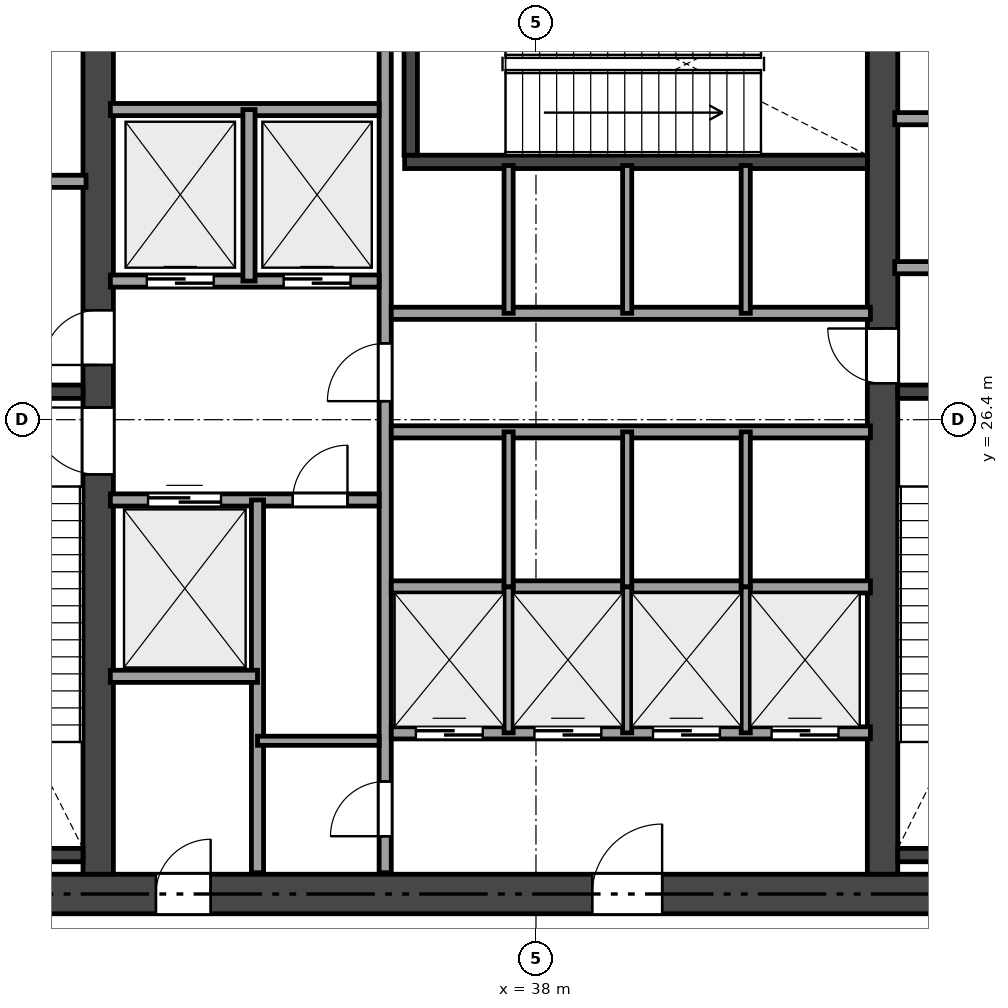
"""IFC4 building model, lengths in metres.
Left out: names, types, materials, properties, quantities, classifications, styles, units other than length and angle.
Written with IfcOpenShell. Run it as: python <this file> out.ifc"""

import sys

from ifc_helpers import new_model, si_unit, direction, frame, frame_2d, origin, place, context, subcontext, project, spatial, rectangle, extrude, element, fill, save


model = new_model("IFC4")
c1 = context("Model", 3, precision=1e-05, world=origin(), true_north=direction((0.0, 1.0)))
c2 = subcontext(c1, "Body", "Model", "MODEL_VIEW")
j1 = project(units=[si_unit("LENGTHUNIT", "METRE"), si_unit("PLANEANGLEUNIT", "RADIAN")], contexts=[c1])
p1 = place(None, origin())
s1 = spatial("IfcSite", under=j1, at=p1, CompositionType="ELEMENT")
p2 = place(p1, origin())
s2 = spatial("IfcBuilding", under=s1, at=p2, CompositionType="ELEMENT")
p3 = place(p2, frame((0.0, 0.0, 10.8)))
s3 = spatial("IfcBuildingStorey", under=s2, at=p3, CompositionType="ELEMENT", Elevation=10.8)
p4 = place(p3, frame((26.475, 18.6, 0.0), z_axis=(0.0, 0.0, 1.0), x_axis=(1.0, 0.0, 0.0)))
e1 = element("IfcWall", 1, at=p4, inside=s3, PredefinedType="SHEAR", context=c2, shape_type="SweptSolid", body=[
    extrude(rectangle(XDim=21.45, YDim=0.65, at=frame_2d((10.725, 0.0))), origin(), (0.0, 0.0, 1.0), 5.05),
])
p5 = place(p4, frame((12.45, 0.0, 0.0)))
e2 = element("IfcOpeningElement", 2, at=p5, cuts=e1, PredefinedType="OPENING", context=c2, shape_type="SweptSolid", body=[
    extrude(rectangle(XDim=1.15, YDim=2.15, at=frame_2d((0.575, 1.075))), frame((0.0, 0.335, 0.0), z_axis=(0.0, -1.0, 0.0), x_axis=(1.0, 0.0, 0.0)), (0.0, 0.0, 1.0), 0.67),
])
p6 = place(p4, frame((5.275, 0.0, 0.0)))
e3 = element("IfcOpeningElement", 3, at=p6, cuts=e1, PredefinedType="OPENING", context=c2, shape_type="SweptSolid", body=[
    extrude(rectangle(XDim=0.9, YDim=2.1, at=frame_2d((0.45, 1.05))), frame((0.0, 0.335, 0.0), z_axis=(0.0, -1.0, 0.0), x_axis=(1.0, 0.0, 0.0)), (0.0, 0.0, 1.0), 0.67),
])
p7 = place(p3, frame((30.8, 18.925, 0.0), z_axis=(0.0, 0.0, 1.0), x_axis=(0.0, 1.0, 0.0)))
e4 = element("IfcWall", 4, at=p7, inside=s3, PredefinedType="SHEAR", context=c2, shape_type="SweptSolid", body=[
    extrude(rectangle(XDim=14.95, YDim=0.5, at=frame_2d((7.475, 0.0))), origin(), (0.0, 0.0, 1.0), 5.05),
])
p8 = place(p7, frame((6.575, 0.0, 0.0)))
e5 = element("IfcOpeningElement", 5, at=p8, cuts=e4, PredefinedType="OPENING", context=c2, shape_type="SweptSolid", body=[
    extrude(rectangle(XDim=1.1, YDim=2.15, at=frame_2d((0.55, 1.075))), frame((0.0, 0.26, 0.0), z_axis=(0.0, -1.0, 0.0), x_axis=(1.0, 0.0, 0.0)), (0.0, 0.0, 1.0), 0.52),
])
p9 = place(p7, frame((8.375, 0.0, 0.0)))
e6 = element("IfcOpeningElement", 6, at=p9, cuts=e4, PredefinedType="OPENING", context=c2, shape_type="SweptSolid", body=[
    extrude(rectangle(XDim=0.9, YDim=2.1, at=frame_2d((0.45, 1.05))), frame((0.0, 0.26, 0.0), z_axis=(0.0, -1.0, 0.0), x_axis=(1.0, 0.0, 0.0)), (0.0, 0.0, 1.0), 0.52),
])
p10 = place(p3, frame((43.7, 18.925, 0.0), z_axis=(0.0, 0.0, 1.0), x_axis=(0.0, 1.0, 0.0)))
e7 = element("IfcWall", 7, at=p10, inside=s3, PredefinedType="SHEAR", context=c2, shape_type="SweptSolid", body=[
    extrude(rectangle(XDim=14.95, YDim=0.5, at=frame_2d((7.475, 0.0))), origin(), (0.0, 0.0, 1.0), 5.05),
])
p11 = place(p10, frame((8.075, 0.0, 0.0)))
e8 = element("IfcOpeningElement", 8, at=p11, cuts=e7, PredefinedType="OPENING", context=c2, shape_type="SweptSolid", body=[
    extrude(rectangle(XDim=0.9, YDim=2.1, at=frame_2d((0.45, 1.05))), frame((0.0, 0.26, 0.0), z_axis=(0.0, -1.0, 0.0), x_axis=(1.0, 0.0, 0.0)), (0.0, 0.0, 1.0), 0.52),
])
for number, where, z_axis, x_axis in (
    (9, (27.125, 26.86, 0.0), (0.0, 0.0, 1.0), (1.0, 0.0, 0.0)),
    (10, (27.125, 19.24, 0.0), (0.0, 0.0, 1.0), (1.0, 0.0, 0.0)),
):
    element("IfcWall", number, at=place(p3, frame(where, z_axis=z_axis, x_axis=x_axis)), inside=s3, PredefinedType="SHEAR", context=c2, shape_type="SweptSolid", body=[
        extrude(rectangle(XDim=3.425, YDim=0.22, at=frame_2d((1.712, 0.0))), origin(), (0.0, 0.0, 1.0), 5.05),
    ])
for number, where, z_axis, x_axis in (
    (11, (43.95, 26.86, 0.0), (0.0, 0.0, 1.0), (1.0, 0.0, 0.0)),
    (12, (43.95, 19.24, 0.0), (0.0, 0.0, 1.0), (1.0, 0.0, 0.0)),
):
    element("IfcWall", number, at=place(p3, frame(where, z_axis=z_axis, x_axis=x_axis)), inside=s3, PredefinedType="SHEAR", context=c2, shape_type="SweptSolid", body=[
        extrude(rectangle(XDim=3.325, YDim=0.22, at=frame_2d((1.663, 0.0))), origin(), (0.0, 0.0, 1.0), 5.05),
    ])
p12 = place(p3, frame((35.84, 30.64, 0.0), z_axis=(0.0, 0.0, 1.0), x_axis=(1.0, 0.0, 0.0)))
e13 = element("IfcWall", 13, at=p12, inside=s3, PredefinedType="SHEAR", context=c2, shape_type="SweptSolid", body=[
    extrude(rectangle(XDim=7.61, YDim=0.22, at=frame_2d((3.805, 0.0))), origin(), (0.0, 0.0, 1.0), 5.05),
])
p13 = place(p3, frame((35.94, 30.75, 0.0), z_axis=(0.0, 0.0, 1.0), x_axis=(0.0, 1.0, 0.0)))
e14 = element("IfcWall", 14, at=p13, inside=s3, PredefinedType="SHEAR", context=c2, shape_type="SweptSolid", body=[
    extrude(rectangle(XDim=3.125, YDim=0.22, at=frame_2d((1.562, 0.0))), origin(), (0.0, 0.0, 1.0), 5.05),
])
p14 = place(p3, frame((27.15, 30.32, 0.0), z_axis=(0.0, 0.0, 1.0), x_axis=(1.0, 0.0, 0.0)))
e15 = element("IfcWall", 15, at=p14, inside=s3, PredefinedType="SOLIDWALL", context=c2, shape_type="SweptSolid", body=[
    extrude(rectangle(XDim=3.45, YDim=0.2, at=frame_2d((1.725, 0.0))), origin(), (0.0, 0.0, 1.0), 5.05),
])
p15 = place(p3, frame((43.9, 28.9, 0.0), z_axis=(0.0, 0.0, 1.0), x_axis=(1.0, 0.0, 0.0)))
e16 = element("IfcWall", 16, at=p15, inside=s3, PredefinedType="SOLIDWALL", context=c2, shape_type="SweptSolid", body=[
    extrude(rectangle(XDim=3.35, YDim=0.2, at=frame_2d((1.675, 0.0))), origin(), (0.0, 0.0, 1.0), 5.05),
])
p16 = place(p15, frame((1.15, 0.0, 0.0)))
e17 = element("IfcOpeningElement", 17, at=p16, cuts=e16, PredefinedType="OPENING", context=c2, shape_type="SweptSolid", body=[
    extrude(rectangle(XDim=0.9, YDim=2.1, at=frame_2d((0.45, 1.05))), frame((0.0, 0.11, 0.0), z_axis=(0.0, -1.0, 0.0), x_axis=(1.0, 0.0, 0.0)), (0.0, 0.0, 1.0), 0.22),
])
p17 = place(p3, frame((43.9, 31.35, 0.0), z_axis=(0.0, 0.0, 1.0), x_axis=(1.0, 0.0, 0.0)))
e18 = element("IfcWall", 18, at=p17, inside=s3, PredefinedType="SOLIDWALL", context=c2, shape_type="SweptSolid", body=[
    extrude(rectangle(XDim=3.35, YDim=0.2, at=frame_2d((1.675, 0.0))), origin(), (0.0, 0.0, 1.0), 5.05),
])
p18 = place(p3, frame((35.52, 18.95, 0.0), z_axis=(0.0, 0.0, 1.0), x_axis=(0.0, 1.0, 0.0)))
e19 = element("IfcWall", 19, at=p18, inside=s3, PredefinedType="SOLIDWALL", context=c2, shape_type="SweptSolid", body=[
    extrude(rectangle(XDim=14.9, YDim=0.2, at=frame_2d((7.45, 0.0))), origin(), (0.0, 0.0, 1.0), 4.571),
])
p19 = place(p18, frame((7.755, 0.0, 0.0)))
e20 = element("IfcOpeningElement", 20, at=p19, cuts=e19, PredefinedType="OPENING", context=c2, shape_type="SweptSolid", body=[
    extrude(rectangle(XDim=0.95, YDim=2.15, at=frame_2d((0.475, 1.075))), frame((0.0, 0.11, 0.0), z_axis=(0.0, -1.0, 0.0), x_axis=(1.0, 0.0, 0.0)), (0.0, 0.0, 1.0), 0.22),
])
p20 = place(p18, frame((0.6, 0.0, 0.0)))
e21 = element("IfcOpeningElement", 21, at=p20, cuts=e19, PredefinedType="OPENING", context=c2, shape_type="SweptSolid", body=[
    extrude(rectangle(XDim=0.9, YDim=2.1, at=frame_2d((0.45, 1.05))), frame((0.0, 0.11, 0.0), z_axis=(0.0, -1.0, 0.0), x_axis=(1.0, 0.0, 0.0)), (0.0, 0.0, 1.0), 0.22),
])
p21 = place(p3, frame((31.0, 28.68, 0.0), z_axis=(0.0, 0.0, 1.0), x_axis=(1.0, 0.0, 0.0)))
e22 = element("IfcWall", 22, at=p21, inside=s3, PredefinedType="SOLIDWALL", context=c2, shape_type="SweptSolid", body=[
    extrude(rectangle(XDim=4.42, YDim=0.2, at=frame_2d((2.21, 0.0))), origin(), (0.0, 0.0, 1.0), 5.05),
])
p22 = place(p21, frame((0.6, 0.0, 0.0)))
e23 = element("IfcOpeningElement", 23, at=p22, cuts=e22, PredefinedType="OPENING", context=c2, shape_type="SweptSolid", body=[
    extrude(rectangle(XDim=1.1, YDim=2.15, at=frame_2d((0.55, 1.075))), frame((0.0, 0.11, 0.0), z_axis=(0.0, -1.0, 0.0), x_axis=(1.0, 0.0, 0.0)), (0.0, 0.0, 1.0), 0.22),
])
p23 = place(p21, frame((2.85, 0.0, 0.0)))
e24 = element("IfcOpeningElement", 24, at=p23, cuts=e22, PredefinedType="OPENING", context=c2, shape_type="SweptSolid", body=[
    extrude(rectangle(XDim=1.1, YDim=2.15, at=frame_2d((0.55, 1.075))), frame((0.0, 0.11, 0.0), z_axis=(0.0, -1.0, 0.0), x_axis=(1.0, 0.0, 0.0)), (0.0, 0.0, 1.0), 0.22),
])
p24 = place(p3, frame((31.0, 31.5, 0.0), z_axis=(0.0, 0.0, 1.0), x_axis=(1.0, 0.0, 0.0)))
e25 = element("IfcWall", 25, at=p24, inside=s3, PredefinedType="SOLIDWALL", context=c2, shape_type="SweptSolid", body=[
    extrude(rectangle(XDim=4.42, YDim=0.2, at=frame_2d((2.21, 0.0))), origin(), (0.0, 0.0, 1.0), 5.05),
])
p25 = place(p3, frame((33.28, 28.68, 0.0), z_axis=(0.0, 0.0, 1.0), x_axis=(0.0, 1.0, 0.0)))
e26 = element("IfcWall", 26, at=p25, inside=s3, PredefinedType="SOLIDWALL", context=c2, shape_type="SweptSolid", body=[
    extrude(rectangle(XDim=2.82, YDim=0.2, at=frame_2d((1.41, 0.0))), origin(), (0.0, 0.0, 1.0), 5.05),
])
p26 = place(p3, frame((31.0, 25.08, 0.0), z_axis=(0.0, 0.0, 1.0), x_axis=(1.0, 0.0, 0.0)))
e27 = element("IfcWall", 27, at=p26, inside=s3, PredefinedType="SOLIDWALL", context=c2, shape_type="SweptSolid", body=[
    extrude(rectangle(XDim=4.42, YDim=0.2, at=frame_2d((2.21, 0.0))), origin(), (0.0, 0.0, 1.0), 5.05),
])
p27 = place(p26, frame((3.0, 0.0, 0.0)))
e28 = element("IfcOpeningElement", 28, at=p27, cuts=e27, PredefinedType="OPENING", context=c2, shape_type="SweptSolid", body=[
    extrude(rectangle(XDim=0.9, YDim=2.1, at=frame_2d((0.45, 1.05))), frame((0.0, 0.11, 0.0), z_axis=(0.0, -1.0, 0.0), x_axis=(1.0, 0.0, 0.0)), (0.0, 0.0, 1.0), 0.22),
])
p28 = place(p26, frame((0.62, 0.0, 0.0)))
e29 = element("IfcOpeningElement", 29, at=p28, cuts=e27, PredefinedType="OPENING", context=c2, shape_type="SweptSolid", body=[
    extrude(rectangle(XDim=1.2, YDim=2.15, at=frame_2d((0.6, 1.075))), frame((0.0, 0.11, 0.0), z_axis=(0.0, -1.0, 0.0), x_axis=(1.0, 0.0, 0.0)), (0.0, 0.0, 1.0), 0.22),
])
p29 = place(p3, frame((33.42, 18.95, 0.0), z_axis=(0.0, 0.0, 1.0), x_axis=(0.0, 1.0, 0.0)))
e30 = element("IfcWall", 30, at=p29, inside=s3, PredefinedType="SOLIDWALL", context=c2, shape_type="SweptSolid", body=[
    extrude(rectangle(XDim=6.13, YDim=0.2, at=frame_2d((3.065, 0.0))), origin(), (0.0, 0.0, 1.0), 4.571),
])
p30 = place(p3, frame((31.0, 22.18, 0.0), z_axis=(0.0, 0.0, 1.0), x_axis=(1.0, 0.0, 0.0)))
e31 = element("IfcWall", 31, at=p30, inside=s3, PredefinedType="SOLIDWALL", context=c2, shape_type="SweptSolid", body=[
    extrude(rectangle(XDim=2.42, YDim=0.2, at=frame_2d((1.21, 0.0))), origin(), (0.0, 0.0, 1.0), 5.05),
])
p31 = place(p3, frame((33.42, 21.12, 0.0), z_axis=(0.0, 0.0, 1.0), x_axis=(1.0, 0.0, 0.0)))
e32 = element("IfcWall", 32, at=p31, inside=s3, PredefinedType="PARTITIONING", context=c2, shape_type="SweptSolid", body=[
    extrude(rectangle(XDim=2.0, YDim=0.15, at=frame_2d((1.0, 0.0))), origin(), (0.0, 0.0, 1.0), 5.05),
])
for number, where, z_axis, x_axis in (
    (33, (35.62, 28.15, 0.0), (0.0, 0.0, 1.0), (1.0, 0.0, 0.0)),
    (34, (35.62, 26.2, 0.0), (0.0, 0.0, 1.0), (1.0, 0.0, 0.0)),
):
    element("IfcWall", number, at=place(p3, frame(where, z_axis=z_axis, x_axis=x_axis)), inside=s3, PredefinedType="SOLIDWALL", context=c2, shape_type="SweptSolid", body=[
        extrude(rectangle(XDim=7.88, YDim=0.2, at=frame_2d((3.94, 0.0))), origin(), (0.0, 0.0, 1.0), 5.05),
    ])
p32 = place(p3, frame((35.62, 23.65, 0.0), z_axis=(0.0, 0.0, 1.0), x_axis=(1.0, 0.0, 0.0)))
e35 = element("IfcWall", 35, at=p32, inside=s3, PredefinedType="SOLIDWALL", context=c2, shape_type="SweptSolid", body=[
    extrude(rectangle(XDim=7.88, YDim=0.2, at=frame_2d((3.94, 0.0))), origin(), (0.0, 0.0, 1.0), 4.571),
])
p33 = place(p3, frame((35.62, 21.25, 0.0), z_axis=(0.0, 0.0, 1.0), x_axis=(1.0, 0.0, 0.0)))
e36 = element("IfcWall", 36, at=p33, inside=s3, PredefinedType="SOLIDWALL", context=c2, shape_type="SweptSolid", body=[
    extrude(rectangle(XDim=7.88, YDim=0.2, at=frame_2d((3.94, 0.0))), origin(), (0.0, 0.0, 1.0), 5.05),
])
p34 = place(p33, frame((0.405, 0.0, 0.0)))
e37 = element("IfcOpeningElement", 37, at=p34, cuts=e36, PredefinedType="OPENING", context=c2, shape_type="SweptSolid", body=[
    extrude(rectangle(XDim=1.1, YDim=2.15, at=frame_2d((0.55, 1.075))), frame((0.0, 0.11, 0.0), z_axis=(0.0, -1.0, 0.0), x_axis=(1.0, 0.0, 0.0)), (0.0, 0.0, 1.0), 0.22),
])
p35 = place(p33, frame((2.355, 0.0, 0.0)))
e38 = element("IfcOpeningElement", 38, at=p35, cuts=e36, PredefinedType="OPENING", context=c2, shape_type="SweptSolid", body=[
    extrude(rectangle(XDim=1.1, YDim=2.15, at=frame_2d((0.55, 1.075))), frame((0.0, 0.11, 0.0), z_axis=(0.0, -1.0, 0.0), x_axis=(1.0, 0.0, 0.0)), (0.0, 0.0, 1.0), 0.22),
])
p36 = place(p33, frame((4.305, 0.0, 0.0)))
e39 = element("IfcOpeningElement", 39, at=p36, cuts=e36, PredefinedType="OPENING", context=c2, shape_type="SweptSolid", body=[
    extrude(rectangle(XDim=1.1, YDim=2.15, at=frame_2d((0.55, 1.075))), frame((0.0, 0.11, 0.0), z_axis=(0.0, -1.0, 0.0), x_axis=(1.0, 0.0, 0.0)), (0.0, 0.0, 1.0), 0.22),
])
p37 = place(p33, frame((6.255, 0.0, 0.0)))
e40 = element("IfcOpeningElement", 40, at=p37, cuts=e36, PredefinedType="OPENING", context=c2, shape_type="SweptSolid", body=[
    extrude(rectangle(XDim=1.1, YDim=2.15, at=frame_2d((0.55, 1.075))), frame((0.0, 0.11, 0.0), z_axis=(0.0, -1.0, 0.0), x_axis=(1.0, 0.0, 0.0)), (0.0, 0.0, 1.0), 0.22),
])
for number, where, z_axis, x_axis in (
    (41, (37.55, 28.15, 0.0), (0.0, 0.0, 1.0), (0.0, 1.0, 0.0)),
    (42, (39.5, 28.15, 0.0), (0.0, 0.0, 1.0), (0.0, 1.0, 0.0)),
    (43, (41.45, 28.15, 0.0), (0.0, 0.0, 1.0), (0.0, 1.0, 0.0)),
):
    element("IfcWall", number, at=place(p3, frame(where, z_axis=z_axis, x_axis=x_axis)), inside=s3, PredefinedType="PARTITIONING", context=c2, shape_type="SweptSolid", body=[
        extrude(rectangle(XDim=2.43, YDim=0.15, at=frame_2d((1.215, 0.0))), origin(), (0.0, 0.0, 1.0), 5.05),
    ])
for number, where, z_axis, x_axis in (
    (44, (37.55, 23.65, 0.0), (0.0, 0.0, 1.0), (0.0, 1.0, 0.0)),
    (45, (39.5, 23.65, 0.0), (0.0, 0.0, 1.0), (0.0, 1.0, 0.0)),
    (46, (41.45, 23.65, 0.0), (0.0, 0.0, 1.0), (0.0, 1.0, 0.0)),
):
    element("IfcWall", number, at=place(p3, frame(where, z_axis=z_axis, x_axis=x_axis)), inside=s3, PredefinedType="PARTITIONING", context=c2, shape_type="SweptSolid", body=[
        extrude(rectangle(XDim=2.55, YDim=0.15, at=frame_2d((1.275, 0.0))), origin(), (0.0, 0.0, 1.0), 4.571),
    ])
for number, where, z_axis, x_axis in (
    (47, (37.55, 21.25, 0.0), (0.0, 0.0, 1.0), (0.0, 1.0, 0.0)),
    (48, (39.5, 21.25, 0.0), (0.0, 0.0, 1.0), (0.0, 1.0, 0.0)),
    (49, (41.45, 21.25, 0.0), (0.0, 0.0, 1.0), (0.0, 1.0, 0.0)),
):
    element("IfcWall", number, at=place(p3, frame(where, z_axis=z_axis, x_axis=x_axis)), inside=s3, PredefinedType="PARTITIONING", context=c2, shape_type="SweptSolid", body=[
        extrude(rectangle(XDim=2.4, YDim=0.15, at=frame_2d((1.2, 0.0))), origin(), (0.0, 0.0, 1.0), 4.571),
    ])
p38 = place(p8, origin())
e50 = element("IfcDoor", 50, at=p38, inside=s3, OperationType="SINGLE_SWING_RIGHT", PredefinedType="DOOR", context=c2, shape_type="SweptSolid", body=[
    extrude(rectangle(XDim=1.1, YDim=2.15, at=frame_2d((0.55, 1.075))), frame((0.0, 0.025, 0.0), z_axis=(0.0, -1.0, 0.0), x_axis=(1.0, 0.0, 0.0)), (0.0, 0.0, 1.0), 0.05),
])
fill(e5, e50)
p39 = place(p19, origin())
e51 = element("IfcDoor", 51, at=p39, inside=s3, OperationType="SINGLE_SWING_LEFT", PredefinedType="DOOR", context=c2, shape_type="SweptSolid", body=[
    extrude(rectangle(XDim=0.95, YDim=2.15, at=frame_2d((0.475, 1.075))), frame((0.0, 0.025, 0.0), z_axis=(0.0, -1.0, 0.0), x_axis=(1.0, 0.0, 0.0)), (0.0, 0.0, 1.0), 0.05),
])
fill(e20, e51)
p40 = place(p11, origin())
e52 = element("IfcDoor", 52, at=p40, inside=s3, OperationType="SINGLE_SWING_RIGHT", PredefinedType="DOOR", context=c2, shape_type="SweptSolid", body=[
    extrude(rectangle(XDim=0.9, YDim=2.1, at=frame_2d((0.45, 1.05))), frame((0.0, 0.025, 0.0), z_axis=(0.0, -1.0, 0.0), x_axis=(1.0, 0.0, 0.0)), (0.0, 0.0, 1.0), 0.05),
])
fill(e8, e52)
p41 = place(p5, origin())
e53 = element("IfcDoor", 53, at=p41, inside=s3, OperationType="SINGLE_SWING_RIGHT", PredefinedType="DOOR", context=c2, shape_type="SweptSolid", body=[
    extrude(rectangle(XDim=1.15, YDim=2.15, at=frame_2d((0.575, 1.075))), frame((0.0, 0.025, 0.0), z_axis=(0.0, -1.0, 0.0), x_axis=(1.0, 0.0, 0.0)), (0.0, 0.0, 1.0), 0.05),
])
fill(e2, e53)
p42 = place(p9, origin())
e54 = element("IfcDoor", 54, at=p42, inside=s3, OperationType="SINGLE_SWING_LEFT", PredefinedType="DOOR", context=c2, shape_type="SweptSolid", body=[
    extrude(rectangle(XDim=0.9, YDim=2.1, at=frame_2d((0.45, 1.05))), frame((0.0, 0.025, 0.0), z_axis=(0.0, -1.0, 0.0), x_axis=(1.0, 0.0, 0.0)), (0.0, 0.0, 1.0), 0.05),
])
fill(e6, e54)
p43 = place(p6, origin())
e55 = element("IfcDoor", 55, at=p43, inside=s3, OperationType="SINGLE_SWING_RIGHT", PredefinedType="DOOR", context=c2, shape_type="SweptSolid", body=[
    extrude(rectangle(XDim=0.9, YDim=2.1, at=frame_2d((0.45, 1.05))), frame((0.0, 0.025, 0.0), z_axis=(0.0, -1.0, 0.0), x_axis=(1.0, 0.0, 0.0)), (0.0, 0.0, 1.0), 0.05),
])
fill(e3, e55)
p44 = place(p20, origin())
e56 = element("IfcDoor", 56, at=p44, inside=s3, OperationType="SINGLE_SWING_LEFT", PredefinedType="DOOR", context=c2, shape_type="SweptSolid", body=[
    extrude(rectangle(XDim=0.9, YDim=2.1, at=frame_2d((0.45, 1.05))), frame((0.0, 0.025, 0.0), z_axis=(0.0, -1.0, 0.0), x_axis=(1.0, 0.0, 0.0)), (0.0, 0.0, 1.0), 0.05),
])
fill(e21, e56)
p45 = place(p27, origin())
e57 = element("IfcDoor", 57, at=p45, inside=s3, OperationType="SINGLE_SWING_RIGHT", PredefinedType="DOOR", context=c2, shape_type="SweptSolid", body=[
    extrude(rectangle(XDim=0.9, YDim=2.1, at=frame_2d((0.45, 1.05))), frame((0.0, 0.025, 0.0), z_axis=(0.0, -1.0, 0.0), x_axis=(1.0, 0.0, 0.0)), (0.0, 0.0, 1.0), 0.05),
])
fill(e28, e57)
p46 = place(p22, origin())
e58 = element("IfcDoor", 58, at=p46, inside=s3, OperationType="SLIDING_TO_LEFT", PredefinedType="DOOR", context=c2, shape_type="SweptSolid", body=[
    extrude(rectangle(XDim=1.1, YDim=2.15, at=frame_2d((0.55, 1.075))), frame((0.0, 0.025, 0.0), z_axis=(0.0, -1.0, 0.0), x_axis=(1.0, 0.0, 0.0)), (0.0, 0.0, 1.0), 0.05),
])
fill(e23, e58)
p47 = place(p23, origin())
e59 = element("IfcDoor", 59, at=p47, inside=s3, OperationType="SLIDING_TO_LEFT", PredefinedType="DOOR", context=c2, shape_type="SweptSolid", body=[
    extrude(rectangle(XDim=1.1, YDim=2.15, at=frame_2d((0.55, 1.075))), frame((0.0, 0.025, 0.0), z_axis=(0.0, -1.0, 0.0), x_axis=(1.0, 0.0, 0.0)), (0.0, 0.0, 1.0), 0.05),
])
fill(e24, e59)
p48 = place(p28, origin())
e60 = element("IfcDoor", 60, at=p48, inside=s3, OperationType="SLIDING_TO_LEFT", PredefinedType="DOOR", context=c2, shape_type="SweptSolid", body=[
    extrude(rectangle(XDim=1.2, YDim=2.15, at=frame_2d((0.6, 1.075))), frame((0.0, 0.025, 0.0), z_axis=(0.0, -1.0, 0.0), x_axis=(1.0, 0.0, 0.0)), (0.0, 0.0, 1.0), 0.05),
])
fill(e29, e60)
p49 = place(p34, origin())
e61 = element("IfcDoor", 61, at=p49, inside=s3, OperationType="SLIDING_TO_LEFT", PredefinedType="DOOR", context=c2, shape_type="SweptSolid", body=[
    extrude(rectangle(XDim=1.1, YDim=2.15, at=frame_2d((0.55, 1.075))), frame((0.0, 0.025, 0.0), z_axis=(0.0, -1.0, 0.0), x_axis=(1.0, 0.0, 0.0)), (0.0, 0.0, 1.0), 0.05),
])
fill(e37, e61)
p50 = place(p35, origin())
e62 = element("IfcDoor", 62, at=p50, inside=s3, OperationType="SLIDING_TO_LEFT", PredefinedType="DOOR", context=c2, shape_type="SweptSolid", body=[
    extrude(rectangle(XDim=1.1, YDim=2.15, at=frame_2d((0.55, 1.075))), frame((0.0, 0.025, 0.0), z_axis=(0.0, -1.0, 0.0), x_axis=(1.0, 0.0, 0.0)), (0.0, 0.0, 1.0), 0.05),
])
fill(e38, e62)
p51 = place(p36, origin())
e63 = element("IfcDoor", 63, at=p51, inside=s3, OperationType="SLIDING_TO_LEFT", PredefinedType="DOOR", context=c2, shape_type="SweptSolid", body=[
    extrude(rectangle(XDim=1.1, YDim=2.15, at=frame_2d((0.55, 1.075))), frame((0.0, 0.025, 0.0), z_axis=(0.0, -1.0, 0.0), x_axis=(1.0, 0.0, 0.0)), (0.0, 0.0, 1.0), 0.05),
])
fill(e39, e63)
p52 = place(p37, origin())
e64 = element("IfcDoor", 64, at=p52, inside=s3, OperationType="SLIDING_TO_LEFT", PredefinedType="DOOR", context=c2, shape_type="SweptSolid", body=[
    extrude(rectangle(XDim=1.1, YDim=2.15, at=frame_2d((0.55, 1.075))), frame((0.0, 0.025, 0.0), z_axis=(0.0, -1.0, 0.0), x_axis=(1.0, 0.0, 0.0)), (0.0, 0.0, 1.0), 0.05),
])
fill(e40, e64)
save(model, sys.argv[1])
